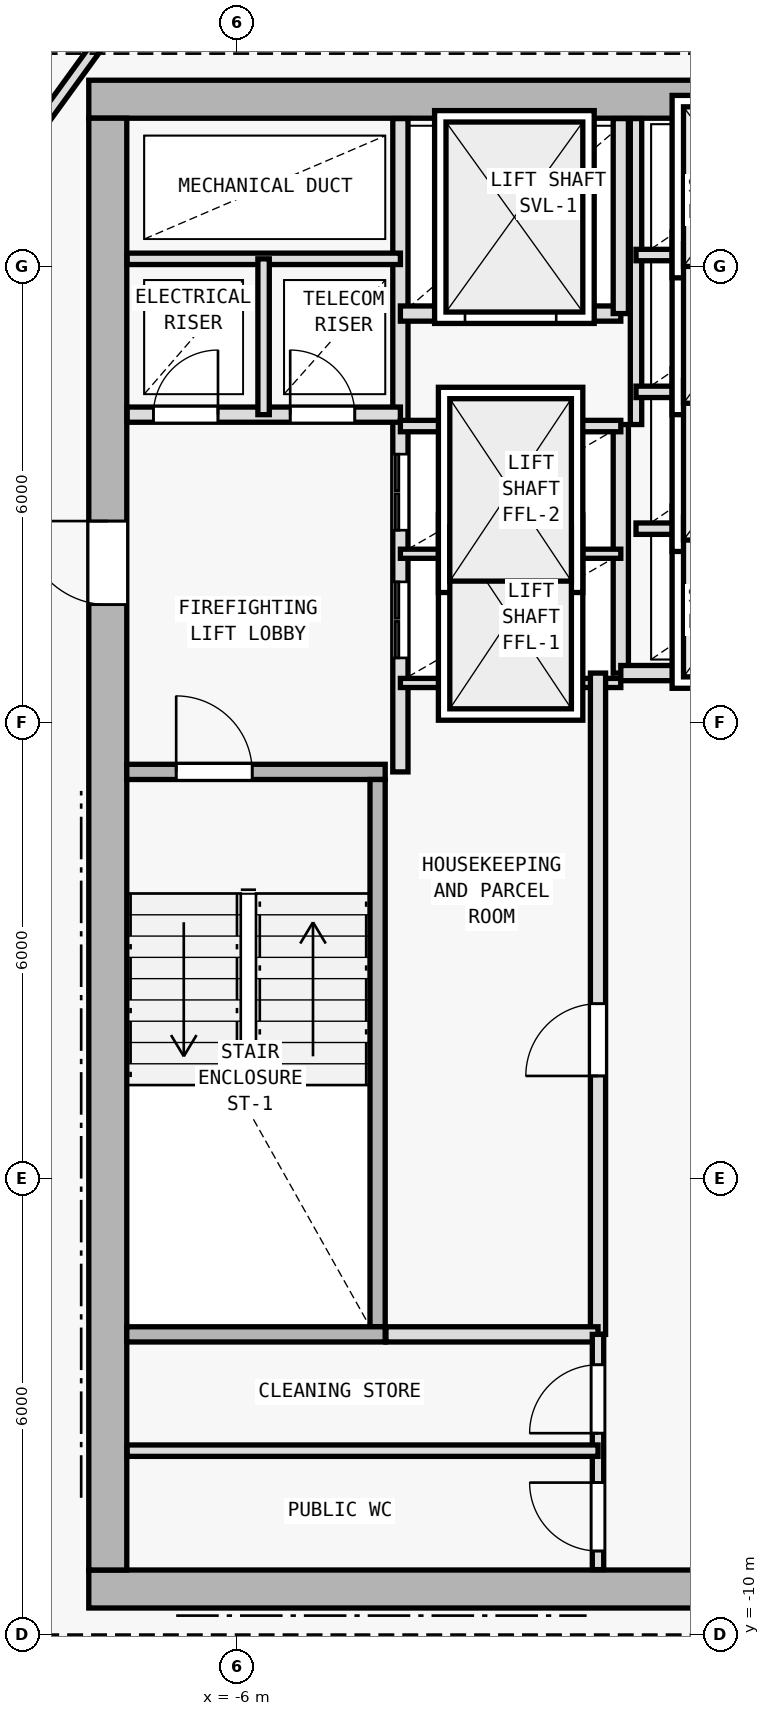
"""IFC4 building model, lengths in metres.
Left out: names, types, materials, properties, quantities, classifications, styles, units other than length and angle.
Written with IfcOpenShell. Run it as: python <this file> out.ifc"""

import sys

from ifc_helpers import new_model, si_unit, direction, frame, frame_2d, origin, origin_2d, place, context, subcontext, project, spatial, rectangle, i_section, extrude, element, fill, save


model = new_model("IFC4")
c1 = context("Model", 3, precision=1e-05, world=origin(), true_north=direction((0.0, 1.0)))
c2 = subcontext(c1, "Body", "Model", "MODEL_VIEW")
j1 = project(units=[si_unit("LENGTHUNIT", "METRE"), si_unit("PLANEANGLEUNIT", "RADIAN")], contexts=[c1])
p1 = place(None, origin())
s1 = spatial("IfcSite", under=j1, at=p1, CompositionType="ELEMENT")
p2 = place(p1, origin())
s2 = spatial("IfcBuilding", under=s1, at=p2, CompositionType="ELEMENT")
p3 = place(p2, frame((0.0, 0.0, 286.8)))
s3 = spatial("IfcBuildingStorey", under=s2, at=p3, CompositionType="ELEMENT", Elevation=286.8)
for number, where, z_axis, x_axis in (
    (1, (-7.7, -9.4, 0.0), (0.0, 0.0, 1.0), (1.0, 0.0, 0.0)),
    (2, (-7.7, 10.2, 0.0), (0.0, 0.0, 1.0), (1.0, 0.0, 0.0)),
    (3, (0.0, -9.4, 0.0), (0.0, 0.0, 1.0), (1.0, 0.0, 0.0)),
    (4, (-7.7, 2.0, 0.0), (0.0, 0.0, 1.0), (1.0, 0.0, 0.0)),
):
    element("IfcColumn", number, at=place(p3, frame(where, z_axis=z_axis, x_axis=x_axis)), inside=s3, PredefinedType="COLUMN", context=c2, shape_type="SweptSolid", body=[
        extrude(i_section(OverallWidth=0.374, OverallDepth=0.372, WebThickness=0.012, FlangeThickness=0.02, FilletRadius=0.015, at=origin_2d()), origin(), (0.0, 0.0, 1.0), 3.6),
    ])
p4 = place(p3, frame((-7.95, -9.4, 0.0), z_axis=(0.0, 0.0, 1.0), x_axis=(1.0, 0.0, 0.0)))
e5 = element("IfcWall", 5, at=p4, inside=s3, PredefinedType="SHEAR", context=c2, shape_type="SweptSolid", body=[
    extrude(rectangle(XDim=15.9, YDim=0.5, at=frame_2d((7.95, 0.0))), origin(), (0.0, 0.0, 1.0), 3.35),
])
p5 = place(p4, frame((9.6, 0.0, 0.0)))
e6 = element("IfcOpeningElement", 6, at=p5, cuts=e5, PredefinedType="OPENING", context=c2, shape_type="SweptSolid", body=[
    extrude(rectangle(XDim=1.5, YDim=2.2, at=frame_2d((0.75, 1.1))), frame((0.0, 0.26, 0.0), z_axis=(0.0, -1.0, 0.0), x_axis=(1.0, 0.0, 0.0)), (0.0, 0.0, 1.0), 0.52),
])
p6 = place(p3, frame((7.95, 10.2, 0.0), z_axis=(0.0, 0.0, 1.0), x_axis=(-1.0, 0.0, 0.0)))
e7 = element("IfcWall", 7, at=p6, inside=s3, PredefinedType="SHEAR", context=c2, shape_type="SweptSolid", body=[
    extrude(rectangle(XDim=15.9, YDim=0.5, at=frame_2d((7.95, 0.0))), origin(), (0.0, 0.0, 1.0), 3.35),
])
p7 = place(p6, frame((4.4, 0.0, 0.0)))
e8 = element("IfcOpeningElement", 8, at=p7, cuts=e7, PredefinedType="OPENING", context=c2, shape_type="SweptSolid", body=[
    extrude(rectangle(XDim=1.1, YDim=2.15, at=frame_2d((0.55, 1.075))), frame((0.0, 0.26, 0.0), z_axis=(0.0, -1.0, 0.0), x_axis=(1.0, 0.0, 0.0)), (0.0, 0.0, 1.0), 0.52),
])
p8 = place(p3, frame((-7.7, -9.15, 0.0), z_axis=(0.0, 0.0, 1.0), x_axis=(0.0, 1.0, 0.0)))
e9 = element("IfcWall", 9, at=p8, inside=s3, PredefinedType="SHEAR", context=c2, shape_type="SweptSolid", body=[
    extrude(rectangle(XDim=19.1, YDim=0.5, at=frame_2d((9.55, 0.0))), origin(), (0.0, 0.0, 1.0), 3.35),
])
p9 = place(p8, frame((12.7, 0.0, 0.0)))
e10 = element("IfcOpeningElement", 10, at=p9, cuts=e9, PredefinedType="OPENING", context=c2, shape_type="SweptSolid", body=[
    extrude(rectangle(XDim=1.1, YDim=2.15, at=frame_2d((0.55, 1.075))), frame((0.0, 0.26, 0.0), z_axis=(0.0, -1.0, 0.0), x_axis=(1.0, 0.0, 0.0)), (0.0, 0.0, 1.0), 0.52),
])
p10 = place(p3, frame((-7.45, 1.35, 0.0), z_axis=(0.0, 0.0, 1.0), x_axis=(1.0, 0.0, 0.0)))
e11 = element("IfcWall", 11, at=p10, inside=s3, PredefinedType="SOLIDWALL", context=c2, shape_type="SweptSolid", body=[
    extrude(rectangle(XDim=3.4, YDim=0.2, at=frame_2d((1.7, 0.0))), origin(), (0.0, 0.0, 1.0), 3.35),
])
p11 = place(p10, frame((0.65, 0.0, 0.0)))
e12 = element("IfcOpeningElement", 12, at=p11, cuts=e11, PredefinedType="OPENING", context=c2, shape_type="SweptSolid", body=[
    extrude(rectangle(XDim=1.0, YDim=2.15, at=frame_2d((0.5, 1.075))), frame((0.0, 0.11, 0.0), z_axis=(0.0, -1.0, 0.0), x_axis=(1.0, 0.0, 0.0)), (0.0, 0.0, 1.0), 0.22),
])
p12 = place(p3, frame((-4.15, -5.95, 0.0), z_axis=(0.0, 0.0, 1.0), x_axis=(0.0, 1.0, 0.0)))
e13 = element("IfcWall", 13, at=p12, inside=s3, PredefinedType="SOLIDWALL", context=c2, shape_type="SweptSolid", body=[
    extrude(rectangle(XDim=7.2, YDim=0.2, at=frame_2d((3.6, 0.0))), origin(), (0.0, 0.0, 1.0), 3.35),
])
p13 = place(p3, frame((-3.85, 1.35, 0.0), z_axis=(0.0, 0.0, 1.0), x_axis=(0.0, 1.0, 0.0)))
e14 = element("IfcWall", 14, at=p13, inside=s3, PredefinedType="SOLIDWALL", context=c2, shape_type="SweptSolid", body=[
    extrude(rectangle(XDim=8.595, YDim=0.2, at=frame_2d((4.297, 0.0))), origin(), (0.0, 0.0, 1.0), 3.35),
])
p14 = place(p13, frame((1.5, 0.0, 0.0)))
e15 = element("IfcOpeningElement", 15, at=p14, cuts=e14, PredefinedType="OPENING", context=c2, shape_type="SweptSolid", body=[
    extrude(rectangle(XDim=1.0, YDim=2.15, at=frame_2d((0.5, 1.075))), frame((0.0, 0.11, 0.0), z_axis=(0.0, -1.0, 0.0), x_axis=(1.0, 0.0, 0.0)), (0.0, 0.0, 1.0), 0.22),
])
p15 = place(p13, frame((3.18, 0.0, 0.0)))
e16 = element("IfcOpeningElement", 16, at=p15, cuts=e14, PredefinedType="OPENING", context=c2, shape_type="SweptSolid", body=[
    extrude(rectangle(XDim=1.0, YDim=2.15, at=frame_2d((0.5, 1.075))), frame((0.0, 0.11, 0.0), z_axis=(0.0, -1.0, 0.0), x_axis=(1.0, 0.0, 0.0)), (0.0, 0.0, 1.0), 0.22),
])
p16 = place(p3, frame((-7.445, 6.05, 0.0), z_axis=(0.0, 0.0, 1.0), x_axis=(1.0, 0.0, 0.0)))
e17 = element("IfcWall", 17, at=p16, inside=s3, PredefinedType="SOLIDWALL", context=c2, shape_type="SweptSolid", body=[
    extrude(rectangle(XDim=3.595, YDim=0.2, at=frame_2d((1.797, 0.0))), origin(), (0.0, 0.0, 1.0), 3.35),
])
p17 = place(p16, frame((0.345, 0.0, 0.0)))
e18 = element("IfcOpeningElement", 18, at=p17, cuts=e17, PredefinedType="OPENING", context=c2, shape_type="SweptSolid", body=[
    extrude(rectangle(XDim=0.85, YDim=2.1, at=frame_2d((0.425, 1.05))), frame((0.0, 0.11, 0.0), z_axis=(0.0, -1.0, 0.0), x_axis=(1.0, 0.0, 0.0)), (0.0, 0.0, 1.0), 0.22),
])
p18 = place(p16, frame((2.145, 0.0, 0.0)))
e19 = element("IfcOpeningElement", 19, at=p18, cuts=e17, PredefinedType="OPENING", context=c2, shape_type="SweptSolid", body=[
    extrude(rectangle(XDim=0.85, YDim=2.1, at=frame_2d((0.425, 1.05))), frame((0.0, 0.11, 0.0), z_axis=(0.0, -1.0, 0.0), x_axis=(1.0, 0.0, 0.0)), (0.0, 0.0, 1.0), 0.22),
])
p19 = place(p3, frame((-7.445, 8.1, 0.0), z_axis=(0.0, 0.0, 1.0), x_axis=(1.0, 0.0, 0.0)))
e20 = element("IfcWall", 20, at=p19, inside=s3, PredefinedType="PARTITIONING", context=c2, shape_type="SweptSolid", body=[
    extrude(rectangle(XDim=3.595, YDim=0.15, at=frame_2d((1.797, 0.0))), origin(), (0.0, 0.0, 1.0), 3.35),
])
p20 = place(p3, frame((-5.65, 6.05, 0.0), z_axis=(0.0, 0.0, 1.0), x_axis=(0.0, 1.0, 0.0)))
e21 = element("IfcWall", 21, at=p20, inside=s3, PredefinedType="PARTITIONING", context=c2, shape_type="SweptSolid", body=[
    extrude(rectangle(XDim=2.05, YDim=0.15, at=frame_2d((1.025, 0.0))), origin(), (0.0, 0.0, 1.0), 3.35),
])
p21 = place(p3, frame((-0.95, 2.65, 0.0), z_axis=(0.0, 0.0, 1.0), x_axis=(0.0, 1.0, 0.0)))
e22 = element("IfcWall", 22, at=p21, inside=s3, PredefinedType="SOLIDWALL", context=c2, shape_type="SweptSolid", body=[
    extrude(rectangle(XDim=3.27, YDim=0.2, at=frame_2d((1.635, 0.0))), origin(), (0.0, 0.0, 1.0), 3.35),
])
for number, where, z_axis, x_axis in (
    (23, (-3.85, 2.52, 0.0), (0.0, 0.0, 1.0), (1.0, 0.0, 0.0)),
    (24, (-3.85, 4.22, 0.0), (0.0, 0.0, 1.0), (1.0, 0.0, 0.0)),
):
    element("IfcWall", number, at=place(p3, frame(where, z_axis=z_axis, x_axis=x_axis)), inside=s3, PredefinedType="PARTITIONING", context=c2, shape_type="SweptSolid", body=[
        extrude(rectangle(XDim=2.9, YDim=0.12, at=frame_2d((1.45, 0.0))), origin(), (0.0, 0.0, 1.0), 3.35),
    ])
p22 = place(p3, frame((-3.85, 5.9, 0.0), z_axis=(0.0, 0.0, 1.0), x_axis=(1.0, 0.0, 0.0)))
e25 = element("IfcWall", 25, at=p22, inside=s3, PredefinedType="PARTITIONING", context=c2, shape_type="SweptSolid", body=[
    extrude(rectangle(XDim=2.9, YDim=0.15, at=frame_2d((1.45, 0.0))), origin(), (0.0, 0.0, 1.0), 3.35),
])
p23 = place(p3, frame((-3.85, 7.38, 0.0), z_axis=(0.0, 0.0, 1.0), x_axis=(1.0, 0.0, 0.0)))
e26 = element("IfcWall", 26, at=p23, inside=s3, PredefinedType="SOLIDWALL", context=c2, shape_type="SweptSolid", body=[
    extrude(rectangle(XDim=2.9, YDim=0.2, at=frame_2d((1.45, 0.0))), origin(), (0.0, 0.0, 1.0), 3.35),
])
p24 = place(p23, frame((0.85, 0.0, 0.0)))
e27 = element("IfcOpeningElement", 27, at=p24, cuts=e26, PredefinedType="OPENING", context=c2, shape_type="SweptSolid", body=[
    extrude(rectangle(XDim=1.2, YDim=2.2, at=frame_2d((0.6, 1.1))), frame((0.0, 0.11, 0.0), z_axis=(0.0, -1.0, 0.0), x_axis=(1.0, 0.0, 0.0)), (0.0, 0.0, 1.0), 0.22),
])
p25 = place(p3, frame((-0.95, 7.38, 0.0), z_axis=(0.0, 0.0, 1.0), x_axis=(0.0, 1.0, 0.0)))
e28 = element("IfcWall", 28, at=p25, inside=s3, PredefinedType="SOLIDWALL", context=c2, shape_type="SweptSolid", body=[
    extrude(rectangle(XDim=2.565, YDim=0.2, at=frame_2d((1.283, 0.0))), origin(), (0.0, 0.0, 1.0), 3.35),
])
p26 = place(p3, frame((-1.25, -6.05, 0.0), z_axis=(0.0, 0.0, 1.0), x_axis=(0.0, 1.0, 0.0)))
e29 = element("IfcWall", 29, at=p26, inside=s3, PredefinedType="SOLIDWALL", context=c2, shape_type="SweptSolid", body=[
    extrude(rectangle(XDim=8.7, YDim=0.2, at=frame_2d((4.35, 0.0))), origin(), (0.0, 0.0, 1.0), 3.35),
])
p27 = place(p26, frame((3.4, 0.0, 0.0)))
e30 = element("IfcOpeningElement", 30, at=p27, cuts=e29, PredefinedType="OPENING", context=c2, shape_type="SweptSolid", body=[
    extrude(rectangle(XDim=0.95, YDim=2.1, at=frame_2d((0.475, 1.05))), frame((0.0, 0.11, 0.0), z_axis=(0.0, -1.0, 0.0), x_axis=(1.0, 0.0, 0.0)), (0.0, 0.0, 1.0), 0.22),
])
p28 = place(p3, frame((-0.95, 2.65, 0.0), z_axis=(0.0, 0.0, 1.0), x_axis=(1.0, 0.0, 0.0)))
e31 = element("IfcWall", 31, at=p28, inside=s3, PredefinedType="SOLIDWALL", context=c2, shape_type="SweptSolid", body=[
    extrude(rectangle(XDim=2.9, YDim=0.2, at=frame_2d((1.45, 0.0))), origin(), (0.0, 0.0, 1.0), 3.35),
])
p29 = place(p3, frame((-0.75, 5.92, 0.0), z_axis=(0.0, 0.0, 1.0), x_axis=(0.0, 1.0, 0.0)))
e32 = element("IfcWall", 32, at=p29, inside=s3, PredefinedType="PARTITIONING", context=c2, shape_type="SweptSolid", body=[
    extrude(rectangle(XDim=4.025, YDim=0.15, at=frame_2d((2.013, 0.0))), origin(), (0.0, 0.0, 1.0), 3.35),
])
for number, where, z_axis, x_axis in (
    (33, (-0.75, 4.55, 0.0), (0.0, 0.0, 1.0), (1.0, 0.0, 0.0)),
    (34, (-0.75, 6.35, 0.0), (0.0, 0.0, 1.0), (1.0, 0.0, 0.0)),
    (35, (-0.75, 8.15, 0.0), (0.0, 0.0, 1.0), (1.0, 0.0, 0.0)),
):
    element("IfcWall", number, at=place(p3, frame(where, z_axis=z_axis, x_axis=x_axis)), inside=s3, PredefinedType="PARTITIONING", context=c2, shape_type="SweptSolid", body=[
        extrude(rectangle(XDim=2.7, YDim=0.15, at=frame_2d((1.35, 0.0))), origin(), (0.0, 0.0, 1.0), 3.35),
    ])
p30 = place(p3, frame((-7.45, -6.05, 0.0), z_axis=(0.0, 0.0, 1.0), x_axis=(1.0, 0.0, 0.0)))
e36 = element("IfcWall", 36, at=p30, inside=s3, PredefinedType="SOLIDWALL", context=c2, shape_type="SweptSolid", body=[
    extrude(rectangle(XDim=3.4, YDim=0.2, at=frame_2d((1.7, 0.0))), origin(), (0.0, 0.0, 1.0), 3.35),
])
p31 = place(p3, frame((-4.04, -6.05, 0.0), z_axis=(0.0, 0.0, 1.0), x_axis=(1.0, 0.0, 0.0)))
e37 = element("IfcWall", 37, at=p31, inside=s3, PredefinedType="SOLIDWALL", context=c2, shape_type="SweptSolid", body=[
    extrude(rectangle(XDim=2.79, YDim=0.2, at=frame_2d((1.395, 0.0))), origin(), (0.0, 0.0, 1.0), 3.35),
])
p32 = place(p3, frame((-1.25, -9.145, 0.0), z_axis=(0.0, 0.0, 1.0), x_axis=(0.0, 1.0, 0.0)))
e38 = element("IfcWall", 38, at=p32, inside=s3, PredefinedType="PARTITIONING", context=c2, shape_type="SweptSolid", body=[
    extrude(rectangle(XDim=3.095, YDim=0.15, at=frame_2d((1.547, 0.0))), origin(), (0.0, 0.0, 1.0), 3.35),
])
p33 = place(p32, frame((1.795, 0.0, 0.0)))
e39 = element("IfcOpeningElement", 39, at=p33, cuts=e38, PredefinedType="OPENING", context=c2, shape_type="SweptSolid", body=[
    extrude(rectangle(XDim=0.9, YDim=2.1, at=frame_2d((0.45, 1.05))), frame((0.0, 0.085, 0.0), z_axis=(0.0, -1.0, 0.0), x_axis=(1.0, 0.0, 0.0)), (0.0, 0.0, 1.0), 0.17),
])
p34 = place(p32, frame((0.245, 0.0, 0.0)))
e40 = element("IfcOpeningElement", 40, at=p34, cuts=e38, PredefinedType="OPENING", context=c2, shape_type="SweptSolid", body=[
    extrude(rectangle(XDim=0.9, YDim=2.1, at=frame_2d((0.45, 1.05))), frame((0.0, 0.085, 0.0), z_axis=(0.0, -1.0, 0.0), x_axis=(1.0, 0.0, 0.0)), (0.0, 0.0, 1.0), 0.17),
])
p35 = place(p3, frame((-7.445, -7.58, 0.0), z_axis=(0.0, 0.0, 1.0), x_axis=(1.0, 0.0, 0.0)))
e41 = element("IfcWall", 41, at=p35, inside=s3, PredefinedType="PARTITIONING", context=c2, shape_type="SweptSolid", body=[
    extrude(rectangle(XDim=6.195, YDim=0.15, at=frame_2d((3.098, 0.0))), origin(), (0.0, 0.0, 1.0), 3.35),
])
p36 = place(p3, frame((-9.78, 8.226, 0.0), z_axis=(0.0, 0.0, 1.0), x_axis=(0.586956386413, 0.809618552436, 0.0)))
e42 = element("IfcWall", 42, at=p36, inside=s3, PredefinedType="PARTITIONING", context=c2, shape_type="SweptSolid", body=[
    extrude(rectangle(XDim=5.008, YDim=0.15, at=frame_2d((2.504, 0.0))), origin(), (0.0, 0.0, 1.0), 3.015),
])
p37 = place(p9, origin())
e43 = element("IfcDoor", 43, at=p37, inside=s3, OperationType="SINGLE_SWING_RIGHT", PredefinedType="DOOR", context=c2, shape_type="SweptSolid", body=[
    extrude(rectangle(XDim=1.1, YDim=2.15, at=frame_2d((0.55, 1.075))), frame((0.0, 0.025, 0.0), z_axis=(0.0, -1.0, 0.0), x_axis=(1.0, 0.0, 0.0)), (0.0, 0.0, 1.0), 0.05),
])
fill(e10, e43)
p38 = place(p11, origin())
e44 = element("IfcDoor", 44, at=p38, inside=s3, OperationType="SINGLE_SWING_LEFT", PredefinedType="DOOR", context=c2, shape_type="SweptSolid", body=[
    extrude(rectangle(XDim=1.0, YDim=2.15, at=frame_2d((0.5, 1.075))), frame((0.0, 0.025, 0.0), z_axis=(0.0, -1.0, 0.0), x_axis=(1.0, 0.0, 0.0)), (0.0, 0.0, 1.0), 0.05),
])
fill(e12, e44)
p39 = place(p17, origin())
e45 = element("IfcDoor", 45, at=p39, inside=s3, OperationType="SINGLE_SWING_RIGHT", PredefinedType="DOOR", context=c2, shape_type="SweptSolid", body=[
    extrude(rectangle(XDim=0.85, YDim=2.1, at=frame_2d((0.425, 1.05))), frame((0.0, 0.025, 0.0), z_axis=(0.0, -1.0, 0.0), x_axis=(1.0, 0.0, 0.0)), (0.0, 0.0, 1.0), 0.05),
])
fill(e18, e45)
p40 = place(p18, origin())
e46 = element("IfcDoor", 46, at=p40, inside=s3, OperationType="SINGLE_SWING_LEFT", PredefinedType="DOOR", context=c2, shape_type="SweptSolid", body=[
    extrude(rectangle(XDim=0.85, YDim=2.1, at=frame_2d((0.425, 1.05))), frame((0.0, 0.025, 0.0), z_axis=(0.0, -1.0, 0.0), x_axis=(1.0, 0.0, 0.0)), (0.0, 0.0, 1.0), 0.05),
])
fill(e19, e46)
p41 = place(p24, origin())
e47 = element("IfcDoor", 47, at=p41, inside=s3, OperationType="DOUBLE_DOOR_SLIDING", PredefinedType="DOOR", context=c2, shape_type="SweptSolid", body=[
    extrude(rectangle(XDim=1.2, YDim=2.2, at=frame_2d((0.6, 1.1))), frame((0.0, 0.025, 0.0), z_axis=(0.0, -1.0, 0.0), x_axis=(1.0, 0.0, 0.0)), (0.0, 0.0, 1.0), 0.05),
])
fill(e27, e47)
p42 = place(p27, origin())
e48 = element("IfcDoor", 48, at=p42, inside=s3, OperationType="SINGLE_SWING_LEFT", PredefinedType="DOOR", context=c2, shape_type="SweptSolid", body=[
    extrude(rectangle(XDim=0.95, YDim=2.1, at=frame_2d((0.475, 1.05))), frame((0.0, 0.025, 0.0), z_axis=(0.0, -1.0, 0.0), x_axis=(1.0, 0.0, 0.0)), (0.0, 0.0, 1.0), 0.05),
])
fill(e30, e48)
p43 = place(p14, origin())
e49 = element("IfcDoor", 49, at=p43, inside=s3, OperationType="DOUBLE_DOOR_SLIDING", PredefinedType="DOOR", context=c2, shape_type="SweptSolid", body=[
    extrude(rectangle(XDim=1.0, YDim=2.15, at=frame_2d((0.5, 1.075))), frame((0.0, 0.025, 0.0), z_axis=(0.0, -1.0, 0.0), x_axis=(1.0, 0.0, 0.0)), (0.0, 0.0, 1.0), 0.05),
])
fill(e15, e49)
p44 = place(p15, origin())
e50 = element("IfcDoor", 50, at=p44, inside=s3, OperationType="DOUBLE_DOOR_SLIDING", PredefinedType="DOOR", context=c2, shape_type="SweptSolid", body=[
    extrude(rectangle(XDim=1.0, YDim=2.15, at=frame_2d((0.5, 1.075))), frame((0.0, 0.025, 0.0), z_axis=(0.0, -1.0, 0.0), x_axis=(1.0, 0.0, 0.0)), (0.0, 0.0, 1.0), 0.05),
])
fill(e16, e50)
p45 = place(p33, origin())
e51 = element("IfcDoor", 51, at=p45, inside=s3, OperationType="SINGLE_SWING_LEFT", PredefinedType="DOOR", context=c2, shape_type="SweptSolid", body=[
    extrude(rectangle(XDim=0.9, YDim=2.1, at=frame_2d((0.45, 1.05))), frame((0.0, 0.025, 0.0), z_axis=(0.0, -1.0, 0.0), x_axis=(1.0, 0.0, 0.0)), (0.0, 0.0, 1.0), 0.05),
])
fill(e39, e51)
p46 = place(p34, origin())
e52 = element("IfcDoor", 52, at=p46, inside=s3, OperationType="SINGLE_SWING_RIGHT", PredefinedType="DOOR", context=c2, shape_type="SweptSolid", body=[
    extrude(rectangle(XDim=0.9, YDim=2.1, at=frame_2d((0.45, 1.05))), frame((0.0, 0.025, 0.0), z_axis=(0.0, -1.0, 0.0), x_axis=(1.0, 0.0, 0.0)), (0.0, 0.0, 1.0), 0.05),
])
fill(e40, e52)
save(model, sys.argv[1])
